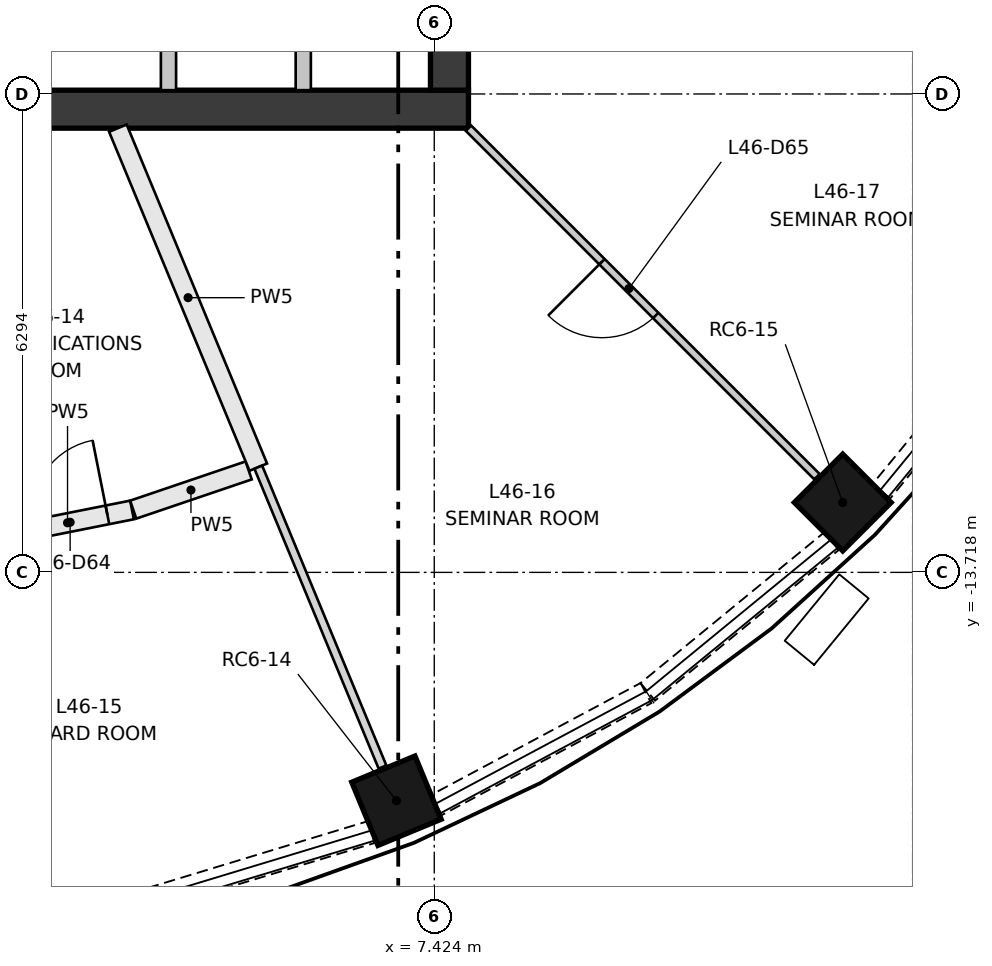
"""IFC4 building model, lengths in metres.
Left out: names, types, materials, properties, quantities, classifications, styles, units other than length and angle.
Written with IfcOpenShell. Run it as: python <this file> out.ifc"""

import sys

from ifc_helpers import new_model, si_unit, direction, frame, frame_2d, origin, origin_2d, place, context, subcontext, project, spatial, rectangle, extrude, element, fill, save


model = new_model("IFC4")
c1 = context("Model", 3, precision=1e-05, world=origin(), true_north=direction((0.0, 1.0)))
c2 = subcontext(c1, "Body", "Model", "MODEL_VIEW")
j1 = project(units=[si_unit("LENGTHUNIT", "METRE"), si_unit("PLANEANGLEUNIT", "RADIAN")], contexts=[c1])
p1 = place(None, origin())
s1 = spatial("IfcSite", under=j1, at=p1, CompositionType="ELEMENT")
p2 = place(p1, origin())
s2 = spatial("IfcBuilding", under=s1, at=p2, CompositionType="ELEMENT")
p3 = place(p2, frame((0.0, 0.0, 174.25)))
s3 = spatial("IfcBuildingStorey", under=s2, at=p3, CompositionType="ELEMENT", Elevation=174.25)
for number, where, z_axis, x_axis in (
    (1, (6.927, -16.722, 0.0), (0.0, 0.0, 1.0), (0.383, -0.924, 0.0)),
    (2, (12.799, -12.799, 0.0), (0.0, 0.0, 1.0), (0.707, -0.707, 0.0)),
):
    element("IfcColumn", number, at=place(p3, frame(where, z_axis=z_axis, x_axis=x_axis)), inside=s3, PredefinedType="COLUMN", context=c2, shape_type="SweptSolid", body=[
        extrude(rectangle(XDim=0.9, YDim=0.9, at=origin_2d()), origin(), (0.0, 0.0, 1.0), 3.35),
    ])
p4 = place(p3, frame((-7.874, -7.624, 0.0), z_axis=(0.0, 0.0, 1.0), x_axis=(1.0, 0.0, 0.0)))
e3 = element("IfcWall", 3, at=p4, inside=s3, PredefinedType="SHEAR", context=c2, shape_type="SweptSolid", body=[
    extrude(rectangle(XDim=15.748, YDim=0.5, at=frame_2d((7.874, 0.0))), origin(), (0.0, 0.0, 1.0), 3.35),
])
p5 = place(p3, frame((7.624, -7.374, 0.0), z_axis=(0.0, 0.0, 1.0), x_axis=(0.0, 1.0, 0.0)))
e4 = element("IfcWall", 4, at=p5, inside=s3, PredefinedType="SHEAR", context=c2, shape_type="SweptSolid", body=[
    extrude(rectangle(XDim=14.748, YDim=0.5, at=frame_2d((7.374, 0.0))), origin(), (0.0, 0.0, 1.0), 3.35),
])
p6 = place(p5, frame((6.874, 0.0, 0.0)))
e5 = element("IfcOpeningElement", 5, at=p6, cuts=e4, PredefinedType="OPENING", context=c2, shape_type="SweptSolid", body=[
    extrude(rectangle(XDim=1.0, YDim=2.1, at=frame_2d((0.5, 1.05))), frame((0.0, 0.26, 0.0), z_axis=(0.0, -1.0, 0.0), x_axis=(1.0, 0.0, 0.0)), (0.0, 0.0, 1.0), 0.52),
])
p7 = place(p5, frame((3.75, 0.0, 0.0)))
e6 = element("IfcOpeningElement", 6, at=p7, cuts=e4, PredefinedType="OPENING", context=c2, shape_type="SweptSolid", body=[
    extrude(rectangle(XDim=1.8, YDim=2.1, at=frame_2d((0.9, 1.05))), frame((0.0, 0.26, 0.0), z_axis=(0.0, -1.0, 0.0), x_axis=(1.0, 0.0, 0.0)), (0.0, 0.0, 1.0), 0.52),
])
p8 = place(p5, frame((9.198, 0.0, 0.0)))
e7 = element("IfcOpeningElement", 7, at=p8, cuts=e4, PredefinedType="OPENING", context=c2, shape_type="SweptSolid", body=[
    extrude(rectangle(XDim=1.8, YDim=2.1, at=frame_2d((0.9, 1.05))), frame((0.0, 0.26, 0.0), z_axis=(0.0, -1.0, 0.0), x_axis=(1.0, 0.0, 0.0)), (0.0, 0.0, 1.0), 0.52),
])
for number, where, z_axis, x_axis in (
    (8, (3.927, -7.374, 0.0), (0.0, 0.0, 1.0), (0.0, 1.0, 0.0)),
    (9, (5.7, -7.374, 0.0), (0.0, 0.0, 1.0), (0.0, 1.0, 0.0)),
):
    element("IfcWall", number, at=place(p3, frame(where, z_axis=z_axis, x_axis=x_axis)), inside=s3, PredefinedType="PARTITIONING", context=c2, shape_type="SweptSolid", body=[
        extrude(rectangle(XDim=3.2, YDim=0.2, at=frame_2d((1.6, 0.0))), origin(), (0.0, 0.0, 1.0), 3.0),
    ])
p9 = place(p3, frame((3.604, -18.042, 0.0), z_axis=(0.0, 0.0, 1.0), x_axis=(0.957001416136, 0.290083245834, 0.0)))
e10 = element("IfcWall", 10, at=p9, inside=s3, PredefinedType="SOLIDWALL", context=c2, shape_type="SweptSolid", body=[
    extrude(rectangle(XDim=3.127, YDim=0.3, at=frame_2d((1.563, 0.0))), origin(), (0.0, 0.0, 1.0), 0.9),
])
p10 = place(p3, frame((7.452, -16.779, 0.0), z_axis=(0.0, 0.0, 1.0), x_axis=(0.882024038027, 0.47120441036, 0.0)))
e11 = element("IfcWall", 11, at=p10, inside=s3, PredefinedType="SOLIDWALL", context=c2, shape_type="SweptSolid", body=[
    extrude(rectangle(XDim=3.125, YDim=0.3, at=frame_2d((1.562, 0.0))), origin(), (0.0, 0.0, 1.0), 0.9),
])
for number, where, z_axis, x_axis in (
    (12, (10.234, -15.29, 0.0), (0.0, 0.0, 1.0), (0.773, 0.634, 0.0)),
    (13, (13.306, -12.651, 0.0), (0.0, 0.0, 1.0), (0.634, 0.773, 0.0)),
):
    element("IfcWall", number, at=place(p3, frame(where, z_axis=z_axis, x_axis=x_axis)), inside=s3, PredefinedType="SOLIDWALL", context=c2, shape_type="SweptSolid", body=[
        extrude(rectangle(XDim=3.127, YDim=0.3, at=frame_2d((1.563, 0.0))), origin(), (0.0, 0.0, 1.0), 0.9),
    ])
p11 = place(p3, frame((1.75, -13.234, 0.0), z_axis=(0.0, 0.0, 1.0), x_axis=(0.98079718542, 0.195030461907, 0.0)))
e14 = element("IfcWall", 14, at=p11, inside=s3, PredefinedType="PARTITIONING", context=c2, shape_type="SweptSolid", body=[
    extrude(rectangle(XDim=1.73, YDim=0.25, at=frame_2d((0.865, 0.0))), origin(), (0.0, 0.0, 1.0), 3.0),
])
p12 = place(p11, frame((0.4, 0.0, 0.0)))
e15 = element("IfcOpeningElement", 15, at=p12, cuts=e14, PredefinedType="OPENING", context=c2, shape_type="SweptSolid", body=[
    extrude(rectangle(XDim=1.0, YDim=2.1, at=frame_2d((0.5, 1.05))), frame((0.0, 0.135, 0.0), z_axis=(0.0, -1.0, 0.0), x_axis=(1.0, 0.0, 0.0)), (0.0, 0.0, 1.0), 0.27),
])
p13 = place(p3, frame((4.982, -12.377, 0.0), z_axis=(0.0, 0.0, 1.0), x_axis=(-0.946919168061, -0.321471754838, 0.0)))
e16 = element("IfcWall", 16, at=p13, inside=s3, PredefinedType="PARTITIONING", context=c2, shape_type="SweptSolid", body=[
    extrude(rectangle(XDim=1.605, YDim=0.25, at=frame_2d((0.802, 0.0))), origin(), (0.0, 0.0, 1.0), 3.0),
])
p14 = place(p3, frame((3.261, -7.874, 0.0), z_axis=(0.0, 0.0, 1.0), x_axis=(0.382707643949, -0.923869503373, 0.0)))
e17 = element("IfcWall", 17, at=p14, inside=s3, PredefinedType="PARTITIONING", context=c2, shape_type="SweptSolid", body=[
    extrude(rectangle(XDim=4.827, YDim=0.25, at=frame_2d((2.414, 0.0))), origin(), (0.0, 0.0, 1.0), 3.0),
])
p15 = place(p3, frame((5.109, -12.334, 0.0), z_axis=(0.0, 0.0, 1.0), x_axis=(0.382669916503, -0.923885130849, 0.0)))
e18 = element("IfcWall", 18, at=p15, inside=s3, PredefinedType="PARTITIONING", context=c2, shape_type="SweptSolid", body=[
    extrude(rectangle(XDim=4.27, YDim=0.11, at=frame_2d((2.135, 0.0))), origin(), (0.0, 0.0, 1.0), 3.0),
])
p16 = place(p3, frame((12.459, -12.459, 0.0), z_axis=(0.0, 0.0, 1.0), x_axis=(-0.707106781187, 0.707106781187, 0.0)))
e19 = element("IfcWall", 19, at=p16, inside=s3, PredefinedType="PARTITIONING", context=c2, shape_type="SweptSolid", body=[
    extrude(rectangle(XDim=6.484, YDim=0.1, at=frame_2d((3.242, 0.0))), origin(), (0.0, 0.0, 1.0), 3.0),
])
p17 = place(p16, frame((3.0, 0.0, 0.0)))
e20 = element("IfcOpeningElement", 20, at=p17, cuts=e19, PredefinedType="OPENING", context=c2, shape_type="SweptSolid", body=[
    extrude(rectangle(XDim=1.0, YDim=2.1, at=frame_2d((0.5, 1.05))), frame((0.0, 0.06, 0.0), z_axis=(0.0, -1.0, 0.0), x_axis=(1.0, 0.0, 0.0)), (0.0, 0.0, 1.0), 0.12),
])
p18 = place(p12, origin())
e21 = element("IfcDoor", 21, at=p18, inside=s3, OperationType="SINGLE_SWING_RIGHT", PredefinedType="DOOR", context=c2, shape_type="SweptSolid", body=[
    extrude(rectangle(XDim=1.0, YDim=2.1, at=frame_2d((0.5, 1.05))), frame((0.0, 0.025, 0.0), z_axis=(0.0, -1.0, 0.0), x_axis=(1.0, 0.0, 0.0)), (0.0, 0.0, 1.0), 0.05),
])
fill(e15, e21)
p19 = place(p17, origin())
e22 = element("IfcDoor", 22, at=p19, inside=s3, OperationType="SINGLE_SWING_RIGHT", PredefinedType="DOOR", context=c2, shape_type="SweptSolid", body=[
    extrude(rectangle(XDim=1.0, YDim=2.1, at=frame_2d((0.5, 1.05))), frame((0.0, 0.025, 0.0), z_axis=(0.0, -1.0, 0.0), x_axis=(1.0, 0.0, 0.0)), (0.0, 0.0, 1.0), 0.05),
])
fill(e20, e22)
save(model, sys.argv[1])
